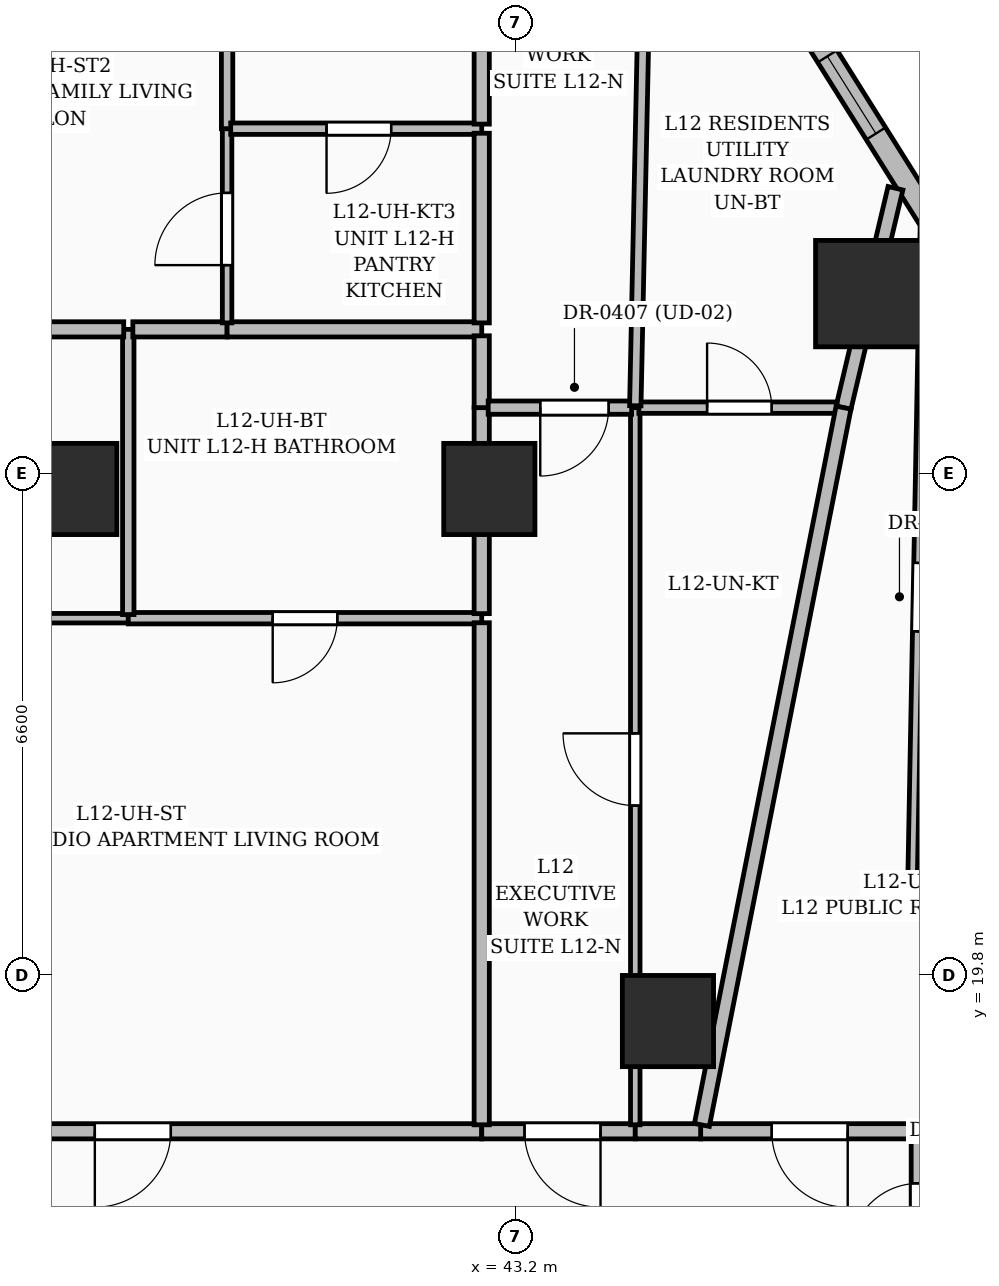
"""IFC4 building model, lengths in metres.
Left out: names, types, materials, properties, quantities, classifications, styles, units other than length and angle.
Written with IfcOpenShell. Run it as: python <this file> out.ifc"""

import sys

from ifc_helpers import new_model, si_unit, direction, frame, frame_2d, origin, origin_2d, place, context, subcontext, project, spatial, rectangle, extrude, element, fill, save


model = new_model("IFC4")
c1 = context("Model", 3, precision=1e-05, world=origin(), true_north=direction((0.0, 1.0)))
c2 = subcontext(c1, "Body", "Model", "MODEL_VIEW")
j1 = project(units=[si_unit("LENGTHUNIT", "METRE"), si_unit("PLANEANGLEUNIT", "RADIAN")], contexts=[c1])
p1 = place(None, origin())
s1 = spatial("IfcSite", under=j1, at=p1, CompositionType="ELEMENT")
p2 = place(p1, origin())
s2 = spatial("IfcBuilding", under=s1, at=p2, CompositionType="ELEMENT")
p3 = place(p2, frame((0.0, 0.0, 53.4)))
s3 = spatial("IfcBuildingStorey", under=s2, at=p3, CompositionType="ELEMENT", Elevation=53.4)
for number, where, z_axis, x_axis in (
    (1, (45.2, 19.2, 0.0), (0.0, 0.0, 1.0), (1.0, 0.0, 0.0)),
    (2, (42.85, 26.2, 0.0), (0.0, 0.0, 1.0), (1.0, 0.0, 0.0)),
    (3, (37.35, 26.2, 0.0), (0.0, 0.0, 1.0), (1.0, 0.0, 0.0)),
):
    element("IfcColumn", number, at=place(p3, frame(where, z_axis=z_axis, x_axis=x_axis)), inside=s3, PredefinedType="COLUMN", context=c2, shape_type="SweptSolid", body=[
        extrude(rectangle(XDim=1.2, YDim=1.2, at=origin_2d()), origin(), (0.0, 0.0, 1.0), 3.6),
    ])
p4 = place(p3, frame((47.842, 28.77, 0.0), z_axis=(0.0, 0.0, 1.0), x_axis=(1.0, 0.0, 0.0)))
e4 = element("IfcColumn", 4, at=p4, inside=s3, PredefinedType="COLUMN", context=c2, shape_type="SweptSolid", body=[
    extrude(rectangle(XDim=1.4, YDim=1.4, at=origin_2d()), origin(), (0.0, 0.0, 1.0), 3.6),
])
p5 = place(p3, frame((46.54, 33.099, 0.0), z_axis=(0.0, 0.0, 1.0), x_axis=(0.531881188868, -0.846818989471, 0.0)))
e5 = element("IfcWall", 5, at=p5, inside=s3, PredefinedType="SOLIDWALL", context=c2, shape_type="SweptSolid", body=[
    extrude(rectangle(XDim=7.095, YDim=0.3, at=frame_2d((3.548, 0.0))), origin(), (0.0, 0.0, 1.0), 3.35),
])
p6 = place(p5, frame((5.05, 0.0, 0.8)))
e6 = element("IfcOpeningElement", 6, at=p6, cuts=e5, PredefinedType="OPENING", context=c2, shape_type="SweptSolid", body=[
    extrude(rectangle(XDim=1.2, YDim=1.8, at=frame_2d((0.6, 0.9))), frame((0.0, 0.16, 0.0), z_axis=(0.0, -1.0, 0.0), x_axis=(1.0, 0.0, 0.0)), (0.0, 0.0, 1.0), 0.32),
])
p7 = place(p5, frame((1.425, 0.0, 0.8)))
e7 = element("IfcOpeningElement", 7, at=p7, cuts=e5, PredefinedType="OPENING", context=c2, shape_type="SweptSolid", body=[
    extrude(rectangle(XDim=1.2, YDim=1.8, at=frame_2d((0.6, 0.9))), frame((0.0, 0.16, 0.0), z_axis=(0.0, -1.0, 0.0), x_axis=(1.0, 0.0, 0.0)), (0.0, 0.0, 1.0), 0.32),
])
p8 = place(p3, frame((48.5, 15.48, 0.0), z_axis=(0.0, 0.0, 1.0), x_axis=(0.0, 1.0, 0.0)))
e8 = element("IfcWall", 8, at=p8, inside=s3, PredefinedType="PARTITIONING", context=c2, shape_type="SweptSolid", body=[
    extrude(rectangle(XDim=2.27, YDim=0.2, at=frame_2d((1.135, 0.0))), origin(), (0.0, 0.0, 1.0), 2.279),
])
p9 = place(p8, frame((0.685, 0.0, 0.0)))
e9 = element("IfcOpeningElement", 9, at=p9, cuts=e8, PredefinedType="OPENING", context=c2, shape_type="SweptSolid", body=[
    extrude(rectangle(XDim=0.9, YDim=2.1, at=frame_2d((0.45, 1.05))), frame((0.0, 0.11, 0.0), z_axis=(0.0, -1.0, 0.0), x_axis=(1.0, 0.0, 0.0)), (0.0, 0.0, 1.0), 0.22),
])
p10 = place(p3, frame((42.75, 17.75, 0.0), z_axis=(0.0, 0.0, 1.0), x_axis=(-1.0, 0.0, 0.0)))
e10 = element("IfcWall", 10, at=p10, inside=s3, PredefinedType="PARTITIONING", context=c2, shape_type="SweptSolid", body=[
    extrude(rectangle(XDim=9.3, YDim=0.2, at=frame_2d((4.65, 0.0))), origin(), (0.0, 0.0, 1.0), 2.309),
])
p11 = place(p10, frame((4.09, 0.0, 0.0)))
e11 = element("IfcOpeningElement", 11, at=p11, cuts=e10, PredefinedType="OPENING", context=c2, shape_type="SweptSolid", body=[
    extrude(rectangle(XDim=1.0, YDim=2.2, at=frame_2d((0.5, 1.1))), frame((0.0, 0.11, 0.0), z_axis=(0.0, -1.0, 0.0), x_axis=(1.0, 0.0, 0.0)), (0.0, 0.0, 1.0), 0.22),
])
p12 = place(p3, frame((48.415, 17.75, 0.0), z_axis=(0.0, 0.0, 1.0), x_axis=(-1.0, 0.0, 0.0)))
e12 = element("IfcWall", 12, at=p12, inside=s3, PredefinedType="PARTITIONING", context=c2, shape_type="SweptSolid", body=[
    extrude(rectangle(XDim=2.785, YDim=0.2, at=frame_2d((1.393, 0.0))), origin(), (0.0, 0.0, 1.0), 2.309),
])
p13 = place(p12, frame((0.85, 0.0, 0.0)))
e13 = element("IfcOpeningElement", 13, at=p13, cuts=e12, PredefinedType="OPENING", context=c2, shape_type="SweptSolid", body=[
    extrude(rectangle(XDim=1.0, YDim=2.2, at=frame_2d((0.5, 1.1))), frame((0.0, 0.11, 0.0), z_axis=(0.0, -1.0, 0.0), x_axis=(1.0, 0.0, 0.0)), (0.0, 0.0, 1.0), 0.22),
])
p14 = place(p3, frame((44.77, 17.75, 0.0), z_axis=(0.0, 0.0, 1.0), x_axis=(-1.0, 0.0, 0.0)))
e14 = element("IfcWall", 14, at=p14, inside=s3, PredefinedType="PARTITIONING", context=c2, shape_type="SweptSolid", body=[
    extrude(rectangle(XDim=2.02, YDim=0.2, at=frame_2d((1.01, 0.0))), origin(), (0.0, 0.0, 1.0), 3.35),
])
p15 = place(p14, frame((0.457, 0.0, 0.0)))
e15 = element("IfcOpeningElement", 15, at=p15, cuts=e14, PredefinedType="OPENING", context=c2, shape_type="SweptSolid", body=[
    extrude(rectangle(XDim=1.0, YDim=2.2, at=frame_2d((0.5, 1.1))), frame((0.0, 0.11, 0.0), z_axis=(0.0, -1.0, 0.0), x_axis=(1.0, 0.0, 0.0)), (0.0, 0.0, 1.0), 0.22),
])
p16 = place(p3, frame((45.63, 17.75, 0.0), z_axis=(0.0, 0.0, 1.0), x_axis=(-1.0, 0.0, 0.0)))
e16 = element("IfcWall", 16, at=p16, inside=s3, PredefinedType="PARTITIONING", context=c2, shape_type="SweptSolid", body=[
    extrude(rectangle(XDim=0.86, YDim=0.2, at=frame_2d((0.43, 0.0))), origin(), (0.0, 0.0, 1.0), 2.309),
])
p17 = place(p3, frame((38.1, 24.5, 0.0), z_axis=(0.0, 0.0, 1.0), x_axis=(-1.0, 0.0, 0.0)))
e17 = element("IfcWall", 17, at=p17, inside=s3, PredefinedType="PARTITIONING", context=c2, shape_type="SweptSolid", body=[
    extrude(rectangle(XDim=4.65, YDim=0.125, at=frame_2d((2.325, 0.0))), origin(), (0.0, 0.0, 1.0), 2.309),
])
p18 = place(p17, frame((1.791, 0.0, 0.0)))
e18 = element("IfcOpeningElement", 18, at=p18, cuts=e17, PredefinedType="OPENING", context=c2, shape_type="SweptSolid", body=[
    extrude(rectangle(XDim=0.95, YDim=2.2, at=frame_2d((0.475, 1.1))), frame((0.0, 0.072, 0.0), z_axis=(0.0, -1.0, 0.0), x_axis=(1.0, 0.0, 0.0)), (0.0, 0.0, 1.0), 0.145),
])
p19 = place(p3, frame((42.75, 24.5, 0.0), z_axis=(0.0, 0.0, 1.0), x_axis=(-1.0, 0.0, 0.0)))
e19 = element("IfcWall", 19, at=p19, inside=s3, PredefinedType="PARTITIONING", context=c2, shape_type="SweptSolid", body=[
    extrude(rectangle(XDim=4.65, YDim=0.15, at=frame_2d((2.325, 0.0))), origin(), (0.0, 0.0, 1.0), 3.35),
])
p20 = place(p19, frame((1.9, 0.0, 0.0)))
e20 = element("IfcOpeningElement", 20, at=p20, cuts=e19, PredefinedType="OPENING", context=c2, shape_type="SweptSolid", body=[
    extrude(rectangle(XDim=0.85, YDim=2.1, at=frame_2d((0.425, 1.05))), frame((0.0, 0.085, 0.0), z_axis=(0.0, -1.0, 0.0), x_axis=(1.0, 0.0, 0.0)), (0.0, 0.0, 1.0), 0.17),
])
p21 = place(p3, frame((42.75, 17.835, 0.0), z_axis=(0.0, 0.0, 1.0), x_axis=(0.0, 1.0, 0.0)))
e21 = element("IfcWall", 21, at=p21, inside=s3, PredefinedType="PARTITIONING", context=c2, shape_type="SweptSolid", body=[
    extrude(rectangle(XDim=6.605, YDim=0.2, at=frame_2d((3.302, 0.0))), origin(), (0.0, 0.0, 1.0), 3.35),
])
p22 = place(p3, frame((38.1, 24.548, 0.0), z_axis=(0.0, 0.0, 1.0), x_axis=(0.0, 1.0, 0.0)))
e22 = element("IfcWall", 22, at=p22, inside=s3, PredefinedType="PARTITIONING", context=c2, shape_type="SweptSolid", body=[
    extrude(rectangle(XDim=3.752, YDim=0.15, at=frame_2d((1.876, 0.0))), origin(), (0.0, 0.0, 1.0), 2.309),
])
p23 = place(p3, frame((38.04, 28.3, 0.0), z_axis=(0.0, 0.0, 1.0), x_axis=(-1.0, 0.0, 0.0)))
e23 = element("IfcWall", 23, at=p23, inside=s3, PredefinedType="PARTITIONING", context=c2, shape_type="SweptSolid", body=[
    extrude(rectangle(XDim=4.505, YDim=0.2, at=frame_2d((2.252, 0.0))), origin(), (0.0, 0.0, 1.0), 2.279),
])
p24 = place(p23, frame((1.823, 0.0, 0.0)))
e24 = element("IfcOpeningElement", 24, at=p24, cuts=e23, PredefinedType="OPENING", context=c2, shape_type="SweptSolid", body=[
    extrude(rectangle(XDim=1.0, YDim=2.2, at=frame_2d((0.5, 1.1))), frame((0.0, 0.11, 0.0), z_axis=(0.0, -1.0, 0.0), x_axis=(1.0, 0.0, 0.0)), (0.0, 0.0, 1.0), 0.22),
])
p25 = place(p3, frame((39.4, 28.3, 0.0), z_axis=(0.0, 0.0, 1.0), x_axis=(-1.0, 0.0, 0.0)))
e25 = element("IfcWall", 25, at=p25, inside=s3, PredefinedType="PARTITIONING", context=c2, shape_type="SweptSolid", body=[
    extrude(rectangle(XDim=1.24, YDim=0.2, at=frame_2d((0.62, 0.0))), origin(), (0.0, 0.0, 1.0), 3.35),
])
p26 = place(p3, frame((42.75, 28.3, 0.0), z_axis=(0.0, 0.0, 1.0), x_axis=(-1.0, 0.0, 0.0)))
e26 = element("IfcWall", 26, at=p26, inside=s3, PredefinedType="PARTITIONING", context=c2, shape_type="SweptSolid", body=[
    extrude(rectangle(XDim=3.35, YDim=0.2, at=frame_2d((1.675, 0.0))), origin(), (0.0, 0.0, 1.0), 2.279),
])
p27 = place(p3, frame((42.75, 24.56, 0.0), z_axis=(0.0, 0.0, 1.0), x_axis=(0.0, 1.0, 0.0)))
e27 = element("IfcWall", 27, at=p27, inside=s3, PredefinedType="PARTITIONING", context=c2, shape_type="SweptSolid", body=[
    extrude(rectangle(XDim=2.71, YDim=0.2, at=frame_2d((1.355, 0.0))), origin(), (0.0, 0.0, 1.0), 2.279),
])
p28 = place(p3, frame((42.75, 27.27, 0.0), z_axis=(0.0, 0.0, 1.0), x_axis=(0.0, 1.0, 0.0)))
e28 = element("IfcWall", 28, at=p28, inside=s3, PredefinedType="PARTITIONING", context=c2, shape_type="SweptSolid", body=[
    extrude(rectangle(XDim=0.945, YDim=0.2, at=frame_2d((0.473, 0.0))), origin(), (0.0, 0.0, 1.0), 2.279),
])
p29 = place(p3, frame((48.58, 29.629, 0.0), z_axis=(0.0, 0.0, 1.0), x_axis=(-0.01892705246, -0.999820867298, 0.0)))
e29 = element("IfcWall", 29, at=p29, inside=s3, PredefinedType="PARTITIONING", context=c2, shape_type="SweptSolid", body=[
    extrude(rectangle(XDim=8.991, YDim=0.125, at=frame_2d((4.495, 0.0))), origin(), (0.0, 0.0, 1.0), 2.37),
])
p30 = place(p29, frame((4.403, 0.0, 0.0)))
e30 = element("IfcOpeningElement", 30, at=p30, cuts=e29, PredefinedType="OPENING", context=c2, shape_type="SweptSolid", body=[
    extrude(rectangle(XDim=0.9, YDim=2.15, at=frame_2d((0.45, 1.075))), frame((0.0, 0.072, 0.0), z_axis=(0.0, -1.0, 0.0), x_axis=(1.0, 0.0, 0.0)), (0.0, 0.0, 1.0), 0.145),
])
p31 = place(p3, frame((48.193, 30.156, 0.0), z_axis=(0.0, 0.0, 1.0), x_axis=(-0.230296152423, -0.973120589742, 0.0)))
e31 = element("IfcWall", 31, at=p31, inside=s3, PredefinedType="PARTITIONING", context=c2, shape_type="SweptSolid", body=[
    extrude(rectangle(XDim=2.966, YDim=0.2, at=frame_2d((1.483, 0.0))), origin(), (0.0, 0.0, 1.0), 2.279),
])
p32 = place(p3, frame((39.4, 28.385, 0.0), z_axis=(0.0, 0.0, 1.0), x_axis=(0.0, 1.0, 0.0)))
e32 = element("IfcWall", 32, at=p32, inside=s3, PredefinedType="PARTITIONING", context=c2, shape_type="SweptSolid", body=[
    extrude(rectangle(XDim=2.555, YDim=0.125, at=frame_2d((1.277, 0.0))), origin(), (0.0, 0.0, 1.0), 3.01),
])
p33 = place(p32, frame((0.76, 0.0, 0.0)))
e33 = element("IfcOpeningElement", 33, at=p33, cuts=e32, PredefinedType="OPENING", context=c2, shape_type="SweptSolid", body=[
    extrude(rectangle(XDim=0.95, YDim=2.2, at=frame_2d((0.475, 1.1))), frame((0.0, 0.072, 0.0), z_axis=(0.0, -1.0, 0.0), x_axis=(1.0, 0.0, 0.0)), (0.0, 0.0, 1.0), 0.145),
])
p34 = place(p3, frame((39.4, 30.94, 0.0), z_axis=(0.0, 0.0, 1.0), x_axis=(0.0, 1.0, 0.0)))
e34 = element("IfcWall", 34, at=p34, inside=s3, PredefinedType="PARTITIONING", context=c2, shape_type="SweptSolid", body=[
    extrude(rectangle(XDim=2.64, YDim=0.15, at=frame_2d((1.32, 0.0))), origin(), (0.0, 0.0, 1.0), 3.01),
])
p35 = place(p3, frame((42.75, 30.94, 0.0), z_axis=(0.0, 0.0, 1.0), x_axis=(-1.0, 0.0, 0.0)))
e35 = element("IfcWall", 35, at=p35, inside=s3, PredefinedType="PARTITIONING", context=c2, shape_type="SweptSolid", body=[
    extrude(rectangle(XDim=3.302, YDim=0.15, at=frame_2d((1.651, 0.0))), origin(), (0.0, 0.0, 1.0), 2.279),
])
p36 = place(p35, frame((1.192, 0.0, 0.0)))
e36 = element("IfcOpeningElement", 36, at=p36, cuts=e35, PredefinedType="OPENING", context=c2, shape_type="SweptSolid", body=[
    extrude(rectangle(XDim=0.85, YDim=2.1, at=frame_2d((0.425, 1.05))), frame((0.0, 0.085, 0.0), z_axis=(0.0, -1.0, 0.0), x_axis=(1.0, 0.0, 0.0)), (0.0, 0.0, 1.0), 0.17),
])
p37 = place(p3, frame((42.75, 28.385, 0.0), z_axis=(0.0, 0.0, 1.0), x_axis=(0.0, 1.0, 0.0)))
e37 = element("IfcWall", 37, at=p37, inside=s3, PredefinedType="PARTITIONING", context=c2, shape_type="SweptSolid", body=[
    extrude(rectangle(XDim=2.495, YDim=0.2, at=frame_2d((1.248, 0.0))), origin(), (0.0, 0.0, 1.0), 2.279),
])
p38 = place(p3, frame((42.75, 31.0, 0.0), z_axis=(0.0, 0.0, 1.0), x_axis=(0.0, 1.0, 0.0)))
e38 = element("IfcWall", 38, at=p38, inside=s3, PredefinedType="PARTITIONING", context=c2, shape_type="SweptSolid", body=[
    extrude(rectangle(XDim=2.58, YDim=0.2, at=frame_2d((1.29, 0.0))), origin(), (0.0, 0.0, 1.0), 2.279),
])
p39 = place(p3, frame((44.77, 17.835, 0.0), z_axis=(0.0, 0.0, 1.0), x_axis=(0.0, 1.0, 0.0)))
e39 = element("IfcWall", 39, at=p39, inside=s3, PredefinedType="PARTITIONING", context=c2, shape_type="SweptSolid", body=[
    extrude(rectangle(XDim=9.435, YDim=0.125, at=frame_2d((4.718, 0.0))), origin(), (0.0, 0.0, 1.0), 2.309),
])
p40 = place(p39, frame((4.2, 0.0, 0.0)))
e40 = element("IfcOpeningElement", 40, at=p40, cuts=e39, PredefinedType="OPENING", context=c2, shape_type="SweptSolid", body=[
    extrude(rectangle(XDim=0.95, YDim=2.2, at=frame_2d((0.475, 1.1))), frame((0.0, 0.072, 0.0), z_axis=(0.0, -1.0, 0.0), x_axis=(1.0, 0.0, 0.0)), (0.0, 0.0, 1.0), 0.145),
])
p41 = place(p3, frame((44.722, 27.27, 0.0), z_axis=(0.0, 0.0, 1.0), x_axis=(-1.0, 0.0, 0.0)))
e41 = element("IfcWall", 41, at=p41, inside=s3, PredefinedType="PARTITIONING", context=c2, shape_type="SweptSolid", body=[
    extrude(rectangle(XDim=1.887, YDim=0.175, at=frame_2d((0.944, 0.0))), origin(), (0.0, 0.0, 1.0), 2.279),
])
p42 = place(p41, frame((0.302, 0.0, 0.0)))
e42 = element("IfcOpeningElement", 42, at=p42, cuts=e41, PredefinedType="OPENING", context=c2, shape_type="SweptSolid", body=[
    extrude(rectangle(XDim=0.9, YDim=2.15, at=frame_2d((0.45, 1.075))), frame((0.0, 0.097, 0.0), z_axis=(0.0, -1.0, 0.0), x_axis=(1.0, 0.0, 0.0)), (0.0, 0.0, 1.0), 0.195),
])
p43 = place(p3, frame((44.817, 27.27, 0.0), z_axis=(0.0, 0.0, 1.0), x_axis=(1.0, 0.0, 0.0)))
e43 = element("IfcWall", 43, at=p43, inside=s3, PredefinedType="PARTITIONING", context=c2, shape_type="SweptSolid", body=[
    extrude(rectangle(XDim=2.608, YDim=0.15, at=frame_2d((1.304, 0.0))), origin(), (0.0, 0.0, 1.0), 2.279),
])
p44 = place(p43, frame((0.897, 0.0, 0.0)))
e44 = element("IfcOpeningElement", 44, at=p44, cuts=e43, PredefinedType="OPENING", context=c2, shape_type="SweptSolid", body=[
    extrude(rectangle(XDim=0.85, YDim=2.1, at=frame_2d((0.425, 1.05))), frame((0.0, 0.085, 0.0), z_axis=(0.0, -1.0, 0.0), x_axis=(1.0, 0.0, 0.0)), (0.0, 0.0, 1.0), 0.17),
])
p45 = place(p3, frame((44.941, 35.421, 0.0), z_axis=(0.0, 0.0, 1.0), x_axis=(-0.020966427288, -0.999780180303, 0.0)))
e45 = element("IfcWall", 45, at=p45, inside=s3, PredefinedType="PARTITIONING", context=c2, shape_type="SweptSolid", body=[
    extrude(rectangle(XDim=8.128, YDim=0.15, at=frame_2d((4.064, 0.0))), origin(), (0.0, 0.0, 1.0), 2.37),
])
p46 = place(p3, frame((47.51, 27.27, 0.0), z_axis=(0.0, 0.0, 1.0), x_axis=(-0.193738465681, -0.981053213091, 0.0)))
e46 = element("IfcWall", 46, at=p46, inside=s3, PredefinedType="PARTITIONING", context=c2, shape_type="SweptSolid", body=[
    extrude(rectangle(XDim=9.619, YDim=0.2, at=frame_2d((4.809, 0.0))), origin(), (0.0, 0.0, 1.0), 2.279),
])
p47 = place(p7, origin())
e47 = element("IfcWindow", 47, at=p47, inside=s3, PartitioningType="SINGLE_PANEL", PredefinedType="WINDOW", context=c2, shape_type="SweptSolid", body=[
    extrude(rectangle(XDim=1.2, YDim=1.8, at=frame_2d((0.6, 0.9))), frame((0.0, 0.03, 0.0), z_axis=(0.0, -1.0, 0.0), x_axis=(1.0, 0.0, 0.0)), (0.0, 0.0, 1.0), 0.06),
])
fill(e7, e47)
p48 = place(p9, origin())
e48 = element("IfcDoor", 48, at=p48, inside=s3, OperationType="SINGLE_SWING_LEFT", PredefinedType="DOOR", context=c2, shape_type="SweptSolid", body=[
    extrude(rectangle(XDim=0.9, YDim=2.1, at=frame_2d((0.45, 1.05))), frame((0.0, 0.025, 0.0), z_axis=(0.0, -1.0, 0.0), x_axis=(1.0, 0.0, 0.0)), (0.0, 0.0, 1.0), 0.05),
])
fill(e9, e48)
p49 = place(p11, origin())
e49 = element("IfcDoor", 49, at=p49, inside=s3, OperationType="SINGLE_SWING_RIGHT", PredefinedType="DOOR", context=c2, shape_type="SweptSolid", body=[
    extrude(rectangle(XDim=1.0, YDim=2.2, at=frame_2d((0.5, 1.1))), frame((0.0, 0.025, 0.0), z_axis=(0.0, -1.0, 0.0), x_axis=(1.0, 0.0, 0.0)), (0.0, 0.0, 1.0), 0.05),
])
fill(e11, e49)
p50 = place(p20, origin())
e50 = element("IfcDoor", 50, at=p50, inside=s3, OperationType="SINGLE_SWING_RIGHT", PredefinedType="DOOR", context=c2, shape_type="SweptSolid", body=[
    extrude(rectangle(XDim=0.85, YDim=2.1, at=frame_2d((0.425, 1.05))), frame((0.0, 0.025, 0.0), z_axis=(0.0, -1.0, 0.0), x_axis=(1.0, 0.0, 0.0)), (0.0, 0.0, 1.0), 0.05),
])
fill(e20, e50)
p51 = place(p13, origin())
e51 = element("IfcDoor", 51, at=p51, inside=s3, OperationType="SINGLE_SWING_LEFT", PredefinedType="DOOR", context=c2, shape_type="SweptSolid", body=[
    extrude(rectangle(XDim=1.0, YDim=2.2, at=frame_2d((0.5, 1.1))), frame((0.0, 0.025, 0.0), z_axis=(0.0, -1.0, 0.0), x_axis=(1.0, 0.0, 0.0)), (0.0, 0.0, 1.0), 0.05),
])
fill(e13, e51)
p52 = place(p30, origin())
e52 = element("IfcDoor", 52, at=p52, inside=s3, OperationType="SINGLE_SWING_RIGHT", PredefinedType="DOOR", context=c2, shape_type="SweptSolid", body=[
    extrude(rectangle(XDim=0.9, YDim=2.15, at=frame_2d((0.45, 1.075))), frame((0.0, 0.025, 0.0), z_axis=(0.0, -1.0, 0.0), x_axis=(1.0, 0.0, 0.0)), (0.0, 0.0, 1.0), 0.05),
])
fill(e30, e52)
p53 = place(p33, origin())
e53 = element("IfcDoor", 53, at=p53, inside=s3, OperationType="SINGLE_SWING_LEFT", PredefinedType="DOOR", context=c2, shape_type="SweptSolid", body=[
    extrude(rectangle(XDim=0.95, YDim=2.2, at=frame_2d((0.475, 1.1))), frame((0.0, 0.025, 0.0), z_axis=(0.0, -1.0, 0.0), x_axis=(1.0, 0.0, 0.0)), (0.0, 0.0, 1.0), 0.05),
])
fill(e33, e53)
p54 = place(p36, origin())
e54 = element("IfcDoor", 54, at=p54, inside=s3, OperationType="SINGLE_SWING_RIGHT", PredefinedType="DOOR", context=c2, shape_type="SweptSolid", body=[
    extrude(rectangle(XDim=0.85, YDim=2.1, at=frame_2d((0.425, 1.05))), frame((0.0, 0.025, 0.0), z_axis=(0.0, -1.0, 0.0), x_axis=(1.0, 0.0, 0.0)), (0.0, 0.0, 1.0), 0.05),
])
fill(e36, e54)
p55 = place(p15, origin())
e55 = element("IfcDoor", 55, at=p55, inside=s3, OperationType="SINGLE_SWING_LEFT", PredefinedType="DOOR", context=c2, shape_type="SweptSolid", body=[
    extrude(rectangle(XDim=1.0, YDim=2.2, at=frame_2d((0.5, 1.1))), frame((0.0, 0.025, 0.0), z_axis=(0.0, -1.0, 0.0), x_axis=(1.0, 0.0, 0.0)), (0.0, 0.0, 1.0), 0.05),
])
fill(e15, e55)
p56 = place(p40, origin())
e56 = element("IfcDoor", 56, at=p56, inside=s3, OperationType="SINGLE_SWING_RIGHT", PredefinedType="DOOR", context=c2, shape_type="SweptSolid", body=[
    extrude(rectangle(XDim=0.95, YDim=2.2, at=frame_2d((0.475, 1.1))), frame((0.0, 0.025, 0.0), z_axis=(0.0, -1.0, 0.0), x_axis=(1.0, 0.0, 0.0)), (0.0, 0.0, 1.0), 0.05),
])
fill(e40, e56)
p57 = place(p44, origin())
e57 = element("IfcDoor", 57, at=p57, inside=s3, OperationType="SINGLE_SWING_LEFT", PredefinedType="DOOR", context=c2, shape_type="SweptSolid", body=[
    extrude(rectangle(XDim=0.85, YDim=2.1, at=frame_2d((0.425, 1.05))), frame((0.0, 0.025, 0.0), z_axis=(0.0, -1.0, 0.0), x_axis=(1.0, 0.0, 0.0)), (0.0, 0.0, 1.0), 0.05),
])
fill(e44, e57)
p58 = place(p42, origin())
e58 = element("IfcDoor", 58, at=p58, inside=s3, OperationType="SINGLE_SWING_RIGHT", PredefinedType="DOOR", context=c2, shape_type="SweptSolid", body=[
    extrude(rectangle(XDim=0.9, YDim=2.15, at=frame_2d((0.45, 1.075))), frame((0.0, 0.025, 0.0), z_axis=(0.0, -1.0, 0.0), x_axis=(1.0, 0.0, 0.0)), (0.0, 0.0, 1.0), 0.05),
])
fill(e42, e58)
save(model, sys.argv[1])
